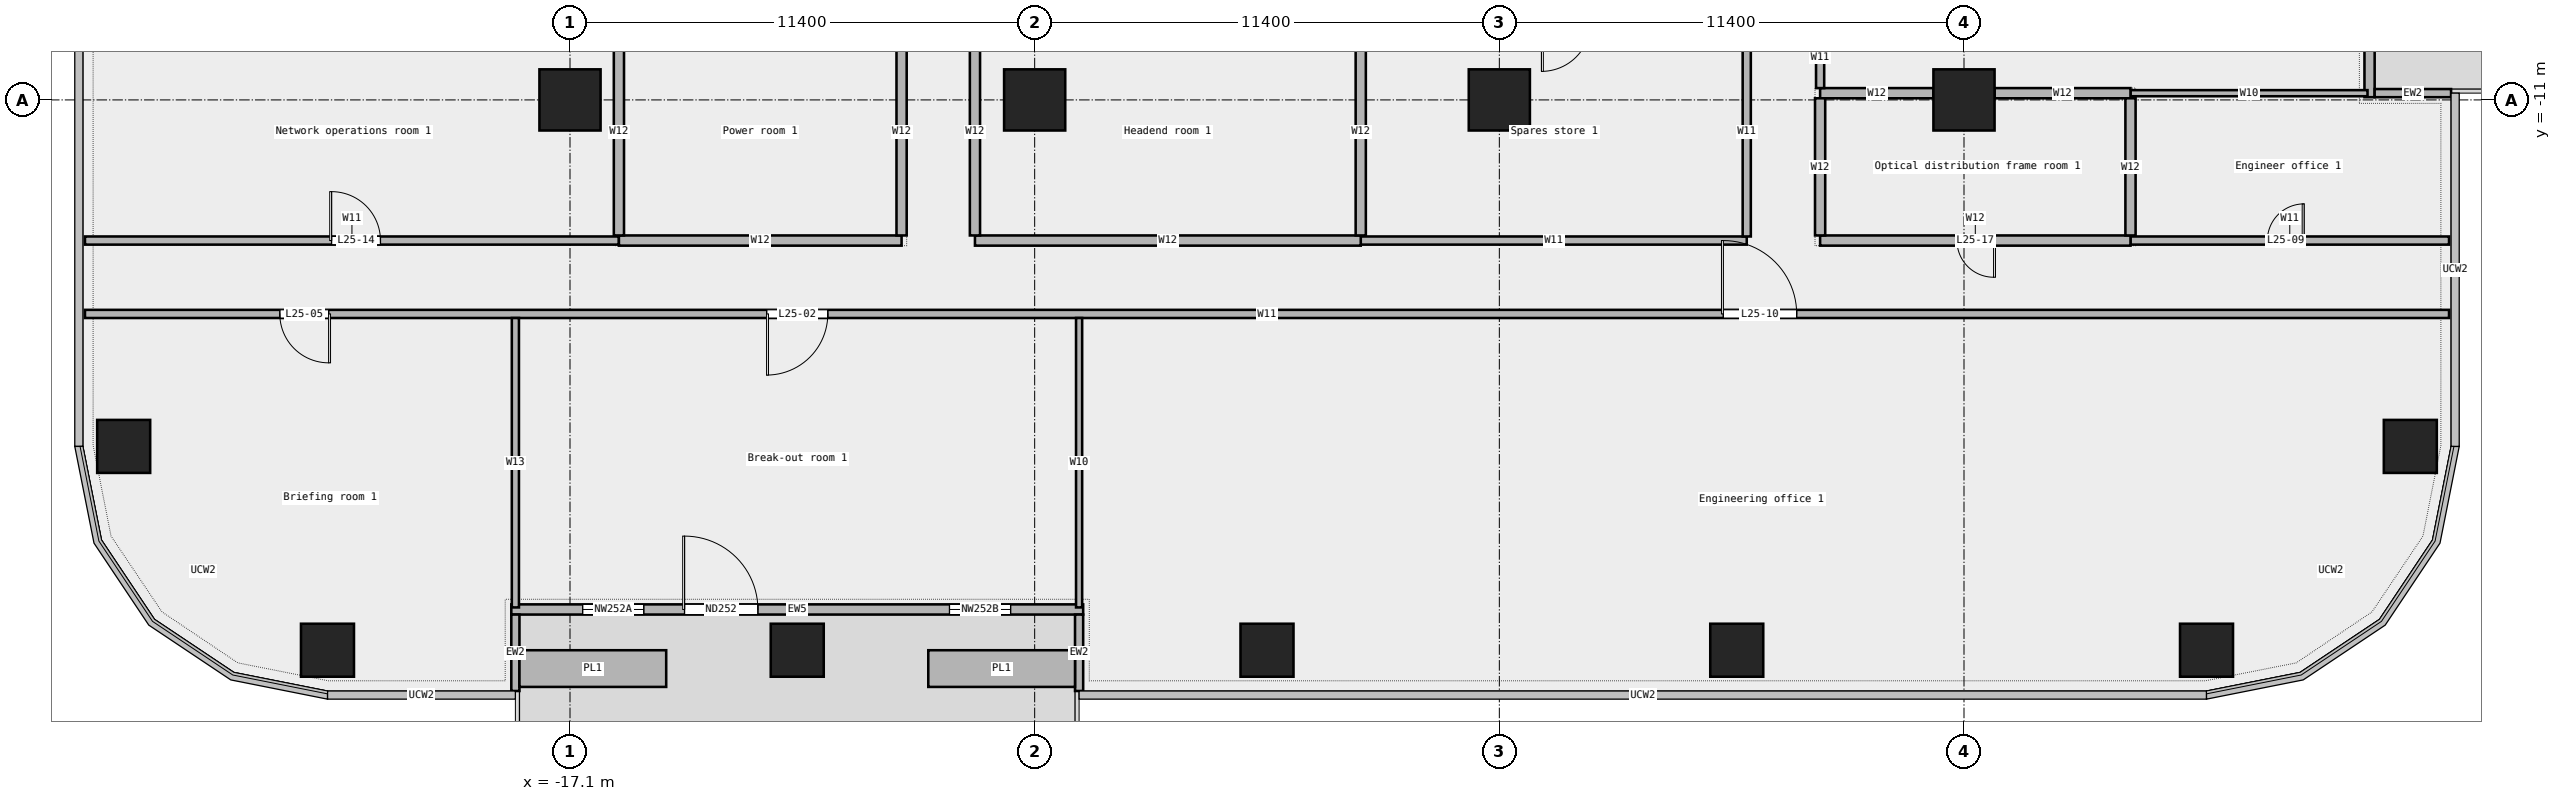
"""IFC4 building model, lengths in metres.
Left out: names, types, materials, properties, quantities, classifications, styles, units other than length and angle.
Written with IfcOpenShell. Run it as: python <this file> out.ifc"""

import sys

from ifc_helpers import new_model, si_unit, direction, frame, frame_2d, origin, origin_2d, place, context, subcontext, project, spatial, rectangle, extrude, element, fill, save


model = new_model("IFC4")
c1 = context("Model", 3, precision=1e-05, world=origin(), true_north=direction((0.0, 1.0)))
c2 = subcontext(c1, "Body", "Model", "MODEL_VIEW")
j1 = project(units=[si_unit("LENGTHUNIT", "METRE"), si_unit("PLANEANGLEUNIT", "RADIAN")], contexts=[c1])
p1 = place(None, origin())
s1 = spatial("IfcSite", under=j1, at=p1, CompositionType="ELEMENT")
p2 = place(p1, origin())
s2 = spatial("IfcBuilding", under=s1, at=p2, CompositionType="ELEMENT")
p3 = place(p2, frame((0.0, 0.0, 126.1)))
s3 = spatial("IfcBuildingStorey", under=s2, at=p3, CompositionType="ELEMENT", Elevation=126.1)
for number, where, z_axis, x_axis in (
    (1, (-23.05, -24.5, 0.0), (0.0, 0.0, 1.0), (1.0, 0.0, 0.0)),
    (2, (-11.525, -24.5, 0.0), (0.0, 0.0, 1.0), (1.0, 0.0, 0.0)),
    (3, (0.0, -24.5, 0.0), (0.0, 0.0, 1.0), (1.0, 0.0, 0.0)),
    (4, (11.525, -24.5, 0.0), (0.0, 0.0, 1.0), (1.0, 0.0, 0.0)),
    (5, (23.05, -24.5, 0.0), (0.0, 0.0, 1.0), (1.0, 0.0, 0.0)),
    (6, (28.05, -19.5, 0.0), (0.0, 0.0, 1.0), (1.0, 0.0, 0.0)),
    (7, (-28.05, -19.5, 0.0), (0.0, 0.0, 1.0), (1.0, 0.0, 0.0)),
):
    element("IfcColumn", number, at=place(p3, frame(where, z_axis=z_axis, x_axis=x_axis)), inside=s3, PredefinedType="COLUMN", context=c2, shape_type="SweptSolid", body=[
        extrude(rectangle(XDim=1.3, YDim=1.3, at=origin_2d()), origin(), (0.0, 0.0, 1.0), 4.05),
    ])
for number, where, z_axis, x_axis in (
    (8, (-17.1, -11.0, 0.0), (0.0, 0.0, 1.0), (1.0, 0.0, 0.0)),
    (9, (-5.7, -11.0, 0.0), (0.0, 0.0, 1.0), (1.0, 0.0, 0.0)),
    (10, (5.7, -11.0, 0.0), (0.0, 0.0, 1.0), (1.0, 0.0, 0.0)),
    (11, (17.1, -11.0, 0.0), (0.0, 0.0, 1.0), (1.0, 0.0, 0.0)),
):
    element("IfcColumn", number, at=place(p3, frame(where, z_axis=z_axis, x_axis=x_axis)), inside=s3, PredefinedType="COLUMN", context=c2, shape_type="SweptSolid", body=[
        extrude(rectangle(XDim=1.5, YDim=1.5, at=origin_2d()), origin(), (0.0, 0.0, 1.0), 4.05),
    ])
p4 = place(p3, frame((-18.54, -23.5, 0.0), z_axis=(0.0, 0.0, 1.0), x_axis=(1.0, 0.0, 0.0)))
e12 = element("IfcWall", 12, at=p4, inside=s3, PredefinedType="STANDARD", context=c2, shape_type="SweptSolid", body=[
    extrude(rectangle(XDim=14.03, YDim=0.25, at=frame_2d((7.015, 0.0))), origin(), (0.0, 0.0, 1.0), 4.05),
])
p5 = place(p4, frame((1.75, 0.0, 0.45)))
e13 = element("IfcOpeningElement", 13, at=p5, cuts=e12, PredefinedType="OPENING", context=c2, shape_type="SweptSolid", body=[
    extrude(rectangle(XDim=1.5, YDim=3.0, at=frame_2d((0.75, 1.5))), frame((0.0, 0.137, 0.0), z_axis=(0.0, -1.0, 0.0), x_axis=(1.0, 0.0, 0.0)), (0.0, 0.0, 1.0), 0.274),
])
p6 = place(p4, frame((4.25, 0.0, 0.0)))
e14 = element("IfcOpeningElement", 14, at=p6, cuts=e12, PredefinedType="OPENING", context=c2, shape_type="SweptSolid", body=[
    extrude(rectangle(XDim=1.8, YDim=2.4, at=frame_2d((0.9, 1.2))), frame((0.0, 0.137, 0.0), z_axis=(0.0, -1.0, 0.0), x_axis=(1.0, 0.0, 0.0)), (0.0, 0.0, 1.0), 0.274),
])
p7 = place(p4, frame((10.75, 0.0, 0.45)))
e15 = element("IfcOpeningElement", 15, at=p7, cuts=e12, PredefinedType="OPENING", context=c2, shape_type="SweptSolid", body=[
    extrude(rectangle(XDim=1.5, YDim=3.0, at=frame_2d((0.75, 1.5))), frame((0.0, 0.137, 0.0), z_axis=(0.0, -1.0, 0.0), x_axis=(1.0, 0.0, 0.0)), (0.0, 0.0, 1.0), 0.274),
])
for number, where, z_axis, x_axis in (
    (16, (-18.44, -25.5, 0.0), (0.0, 0.0, 1.0), (0.0, 1.0, 0.0)),
    (17, (-4.61, -25.5, 0.0), (0.0, 0.0, 1.0), (0.0, 1.0, 0.0)),
):
    element("IfcWall", number, at=place(p3, frame(where, z_axis=z_axis, x_axis=x_axis)), inside=s3, PredefinedType="STANDARD", context=c2, shape_type="SweptSolid", body=[
        extrude(rectangle(XDim=1.875, YDim=0.2, at=frame_2d((0.938, 0.0))), origin(), (0.0, 0.0, 1.0), 4.05),
    ])
for number, where, z_axis, x_axis in (
    (18, (-18.34, -24.95, 0.0), (0.0, 0.0, 1.0), (1.0, 0.0, 0.0)),
    (19, (-8.31, -24.95, 0.0), (0.0, 0.0, 1.0), (1.0, 0.0, 0.0)),
):
    element("IfcWall", number, at=place(p3, frame(where, z_axis=z_axis, x_axis=x_axis)), inside=s3, PredefinedType="STANDARD", context=c2, shape_type="SweptSolid", body=[
        extrude(rectangle(XDim=3.6, YDim=0.9, at=frame_2d((1.8, 0.0))), origin(), (0.0, 0.0, 1.0), 0.7),
    ])
p8 = place(p3, frame((27.05, -10.933, 0.0), z_axis=(0.0, 0.0, 1.0), x_axis=(0.0, 1.0, 0.0)))
e20 = element("IfcWall", 20, at=p8, inside=s3, PredefinedType="STANDARD", context=c2, shape_type="SweptSolid", body=[
    extrude(rectangle(XDim=13.2, YDim=0.25, at=frame_2d((6.6, 0.0))), origin(), (0.0, 0.0, 1.0), 4.05),
])
p9 = place(p8, frame((1.5, 0.0, 0.45)))
e21 = element("IfcOpeningElement", 21, at=p9, cuts=e20, PredefinedType="OPENING", context=c2, shape_type="SweptSolid", body=[
    extrude(rectangle(XDim=1.5, YDim=3.0, at=frame_2d((0.75, 1.5))), frame((0.0, 0.137, 0.0), z_axis=(0.0, -1.0, 0.0), x_axis=(1.0, 0.0, 0.0)), (0.0, 0.0, 1.0), 0.274),
])
p10 = place(p8, frame((5.75, 0.0, 0.0)))
e22 = element("IfcOpeningElement", 22, at=p10, cuts=e20, PredefinedType="OPENING", context=c2, shape_type="SweptSolid", body=[
    extrude(rectangle(XDim=1.8, YDim=2.4, at=frame_2d((0.9, 1.2))), frame((0.0, 0.137, 0.0), z_axis=(0.0, -1.0, 0.0), x_axis=(1.0, 0.0, 0.0)), (0.0, 0.0, 1.0), 0.274),
])
p11 = place(p8, frame((10.25, 0.0, 0.45)))
e23 = element("IfcOpeningElement", 23, at=p11, cuts=e20, PredefinedType="OPENING", context=c2, shape_type="SweptSolid", body=[
    extrude(rectangle(XDim=1.5, YDim=3.0, at=frame_2d((0.75, 1.5))), frame((0.0, 0.137, 0.0), z_axis=(0.0, -1.0, 0.0), x_axis=(1.0, 0.0, 0.0)), (0.0, 0.0, 1.0), 0.274),
])
p12 = place(p3, frame((29.05, -10.833, 0.0), z_axis=(0.0, 0.0, 1.0), x_axis=(-1.0, 0.0, 0.0)))
e24 = element("IfcWall", 24, at=p12, inside=s3, PredefinedType="STANDARD", context=c2, shape_type="SweptSolid", body=[
    extrude(rectangle(XDim=1.875, YDim=0.2, at=frame_2d((0.938, 0.0))), origin(), (0.0, 0.0, 1.0), 4.05),
])
p13 = place(p3, frame((-29.0, -16.25, 0.0), z_axis=(0.0, 0.0, 1.0), x_axis=(1.0, 0.0, 0.0)))
e25 = element("IfcWall", 25, at=p13, inside=s3, PredefinedType="PARTITIONING", context=c2, shape_type="SweptSolid", body=[
    extrude(rectangle(XDim=58.0, YDim=0.2, at=frame_2d((29.0, 0.0))), origin(), (0.0, 0.0, 1.0), 4.05),
])
p14 = place(p13, frame((16.725, 0.0, 0.0)))
e26 = element("IfcOpeningElement", 26, at=p14, cuts=e25, PredefinedType="OPENING", context=c2, shape_type="SweptSolid", body=[
    extrude(rectangle(XDim=1.5, YDim=2.1, at=frame_2d((0.75, 1.05))), frame((0.0, 0.112, 0.0), z_axis=(0.0, -1.0, 0.0), x_axis=(1.0, 0.0, 0.0)), (0.0, 0.0, 1.0), 0.224),
])
p15 = place(p13, frame((4.78, 0.0, 0.0)))
e27 = element("IfcOpeningElement", 27, at=p15, cuts=e25, PredefinedType="OPENING", context=c2, shape_type="SweptSolid", body=[
    extrude(rectangle(XDim=1.2, YDim=2.1, at=frame_2d((0.6, 1.05))), frame((0.0, 0.112, 0.0), z_axis=(0.0, -1.0, 0.0), x_axis=(1.0, 0.0, 0.0)), (0.0, 0.0, 1.0), 0.224),
])
p16 = place(p13, frame((40.195, 0.0, 0.0)))
e28 = element("IfcOpeningElement", 28, at=p16, cuts=e25, PredefinedType="OPENING", context=c2, shape_type="SweptSolid", body=[
    extrude(rectangle(XDim=1.8, YDim=2.1, at=frame_2d((0.9, 1.05))), frame((0.0, 0.112, 0.0), z_axis=(0.0, -1.0, 0.0), x_axis=(1.0, 0.0, 0.0)), (0.0, 0.0, 1.0), 0.224),
])
p17 = place(p3, frame((-29.0, -14.45, 0.0), z_axis=(0.0, 0.0, 1.0), x_axis=(1.0, 0.0, 0.0)))
e29 = element("IfcWall", 29, at=p17, inside=s3, PredefinedType="PARTITIONING", context=c2, shape_type="SweptSolid", body=[
    extrude(rectangle(XDim=13.1, YDim=0.2, at=frame_2d((6.55, 0.0))), origin(), (0.0, 0.0, 1.0), 4.05),
])
p18 = place(p17, frame((6.05, 0.0, 0.0)))
e30 = element("IfcOpeningElement", 30, at=p18, cuts=e29, PredefinedType="OPENING", context=c2, shape_type="SweptSolid", body=[
    extrude(rectangle(XDim=1.2, YDim=2.1, at=frame_2d((0.6, 1.05))), frame((0.0, 0.112, 0.0), z_axis=(0.0, -1.0, 0.0), x_axis=(1.0, 0.0, 0.0)), (0.0, 0.0, 1.0), 0.224),
])
p19 = place(p3, frame((2.3, -14.45, 0.0), z_axis=(0.0, 0.0, 1.0), x_axis=(1.0, 0.0, 0.0)))
e31 = element("IfcWall", 31, at=p19, inside=s3, PredefinedType="PARTITIONING", context=c2, shape_type="SweptSolid", body=[
    extrude(rectangle(XDim=9.47, YDim=0.2, at=frame_2d((4.735, 0.0))), origin(), (0.0, 0.0, 1.0), 4.05),
])
p20 = place(p3, frame((21.185, -14.45, 0.0), z_axis=(0.0, 0.0, 1.0), x_axis=(1.0, 0.0, 0.0)))
e32 = element("IfcWall", 32, at=p20, inside=s3, PredefinedType="PARTITIONING", context=c2, shape_type="SweptSolid", body=[
    extrude(rectangle(XDim=7.815, YDim=0.2, at=frame_2d((3.907, 0.0))), origin(), (0.0, 0.0, 1.0), 4.05),
])
p21 = place(p20, frame((3.357, 0.0, 0.0)))
e33 = element("IfcOpeningElement", 33, at=p21, cuts=e32, PredefinedType="OPENING", context=c2, shape_type="SweptSolid", body=[
    extrude(rectangle(XDim=0.9, YDim=2.1, at=frame_2d((0.45, 1.05))), frame((0.0, 0.112, 0.0), z_axis=(0.0, -1.0, 0.0), x_axis=(1.0, 0.0, 0.0)), (0.0, 0.0, 1.0), 0.224),
])
p22 = place(p3, frame((-15.9, -14.45, 0.0), z_axis=(0.0, 0.0, 1.0), x_axis=(1.0, 0.0, 0.0)))
e34 = element("IfcWall", 34, at=p22, inside=s3, PredefinedType="PARTITIONING", context=c2, shape_type="SweptSolid", body=[
    extrude(rectangle(XDim=6.935, YDim=0.25, at=frame_2d((3.467, 0.0))), origin(), (0.0, 0.0, 1.0), 4.05),
])
p23 = place(p3, frame((-7.165, -14.45, 0.0), z_axis=(0.0, 0.0, 1.0), x_axis=(1.0, 0.0, 0.0)))
e35 = element("IfcWall", 35, at=p23, inside=s3, PredefinedType="PARTITIONING", context=c2, shape_type="SweptSolid", body=[
    extrude(rectangle(XDim=9.465, YDim=0.25, at=frame_2d((4.732, 0.0))), origin(), (0.0, 0.0, 1.0), 4.05),
])
p24 = place(p3, frame((13.57, -14.45, 0.0), z_axis=(0.0, 0.0, 1.0), x_axis=(1.0, 0.0, 0.0)))
e36 = element("IfcWall", 36, at=p24, inside=s3, PredefinedType="PARTITIONING", context=c2, shape_type="SweptSolid", body=[
    extrude(rectangle(XDim=7.615, YDim=0.25, at=frame_2d((3.808, 0.0))), origin(), (0.0, 0.0, 1.0), 4.05),
])
p25 = place(p24, frame((3.357, 0.0, 0.0)))
e37 = element("IfcOpeningElement", 37, at=p25, cuts=e36, PredefinedType="OPENING", context=c2, shape_type="SweptSolid", body=[
    extrude(rectangle(XDim=0.9, YDim=2.1, at=frame_2d((0.45, 1.05))), frame((0.0, 0.137, 0.0), z_axis=(0.0, -1.0, 0.0), x_axis=(1.0, 0.0, 0.0)), (0.0, 0.0, 1.0), 0.274),
])
p26 = place(p3, frame((21.185, -10.835, 0.0), z_axis=(0.0, 0.0, 1.0), x_axis=(1.0, 0.0, 0.0)))
e38 = element("IfcWall", 38, at=p26, inside=s3, PredefinedType="PARTITIONING", context=c2, shape_type="SweptSolid", body=[
    extrude(rectangle(XDim=5.815, YDim=0.15, at=frame_2d((2.907, 0.0))), origin(), (0.0, 0.0, 1.0), 4.05),
])
p27 = place(p3, frame((13.57, -10.835, 0.0), z_axis=(0.0, 0.0, 1.0), x_axis=(1.0, 0.0, 0.0)))
e39 = element("IfcWall", 39, at=p27, inside=s3, PredefinedType="PARTITIONING", context=c2, shape_type="SweptSolid", body=[
    extrude(rectangle(XDim=2.78, YDim=0.25, at=frame_2d((1.39, 0.0))), origin(), (0.0, 0.0, 1.0), 4.05),
])
p28 = place(p3, frame((17.85, -10.835, 0.0), z_axis=(0.0, 0.0, 1.0), x_axis=(1.0, 0.0, 0.0)))
e40 = element("IfcWall", 40, at=p28, inside=s3, PredefinedType="PARTITIONING", context=c2, shape_type="SweptSolid", body=[
    extrude(rectangle(XDim=3.335, YDim=0.25, at=frame_2d((1.667, 0.0))), origin(), (0.0, 0.0, 1.0), 4.05),
])
p29 = place(p3, frame((-18.44, -23.45, 0.0), z_axis=(0.0, 0.0, 1.0), x_axis=(0.0, 1.0, 0.0)))
e41 = element("IfcWall", 41, at=p29, inside=s3, PredefinedType="PARTITIONING", context=c2, shape_type="SweptSolid", body=[
    extrude(rectangle(XDim=7.1, YDim=0.175, at=frame_2d((3.55, 0.0))), origin(), (0.0, 0.0, 1.0), 4.05),
])
for number, where, z_axis, x_axis in (
    (42, (-15.9, -14.325, 0.0), (0.0, 0.0, 1.0), (0.0, 1.0, 0.0)),
    (43, (-8.965, -14.325, 0.0), (0.0, 0.0, 1.0), (0.0, 1.0, 0.0)),
    (44, (-7.165, -14.325, 0.0), (0.0, 0.0, 1.0), (0.0, 1.0, 0.0)),
):
    element("IfcWall", number, at=place(p3, frame(where, z_axis=z_axis, x_axis=x_axis)), inside=s3, PredefinedType="PARTITIONING", context=c2, shape_type="SweptSolid", body=[
        extrude(rectangle(XDim=5.1, YDim=0.25, at=frame_2d((2.55, 0.0))), origin(), (0.0, 0.0, 1.0), 4.05),
    ])
p30 = place(p3, frame((-4.61, -23.45, 0.0), z_axis=(0.0, 0.0, 1.0), x_axis=(0.0, 1.0, 0.0)))
e45 = element("IfcWall", 45, at=p30, inside=s3, PredefinedType="PARTITIONING", context=c2, shape_type="SweptSolid", body=[
    extrude(rectangle(XDim=7.1, YDim=0.15, at=frame_2d((3.55, 0.0))), origin(), (0.0, 0.0, 1.0), 4.05),
])
p31 = place(p3, frame((2.3, -14.325, 0.0), z_axis=(0.0, 0.0, 1.0), x_axis=(0.0, 1.0, 0.0)))
e46 = element("IfcWall", 46, at=p31, inside=s3, PredefinedType="PARTITIONING", context=c2, shape_type="SweptSolid", body=[
    extrude(rectangle(XDim=5.1, YDim=0.25, at=frame_2d((2.55, 0.0))), origin(), (0.0, 0.0, 1.0), 4.05),
])
p32 = place(p3, frame((11.77, -14.35, 0.0), z_axis=(0.0, 0.0, 1.0), x_axis=(0.0, 1.0, 0.0)))
e47 = element("IfcWall", 47, at=p32, inside=s3, PredefinedType="PARTITIONING", context=c2, shape_type="SweptSolid", body=[
    extrude(rectangle(XDim=5.15, YDim=0.2, at=frame_2d((2.575, 0.0))), origin(), (0.0, 0.0, 1.0), 4.05),
])
p33 = place(p3, frame((13.57, -10.71, 0.0), z_axis=(0.0, 0.0, 1.0), x_axis=(0.0, 1.0, 0.0)))
e48 = element("IfcWall", 48, at=p33, inside=s3, PredefinedType="PARTITIONING", context=c2, shape_type="SweptSolid", body=[
    extrude(rectangle(XDim=1.51, YDim=0.2, at=frame_2d((0.755, 0.0))), origin(), (0.0, 0.0, 1.0), 4.05),
])
for number, where, z_axis, x_axis in (
    (49, (13.57, -14.325, 0.0), (0.0, 0.0, 1.0), (0.0, 1.0, 0.0)),
    (50, (21.185, -14.325, 0.0), (0.0, 0.0, 1.0), (0.0, 1.0, 0.0)),
):
    element("IfcWall", number, at=place(p3, frame(where, z_axis=z_axis, x_axis=x_axis)), inside=s3, PredefinedType="PARTITIONING", context=c2, shape_type="SweptSolid", body=[
        extrude(rectangle(XDim=3.365, YDim=0.25, at=frame_2d((1.683, 0.0))), origin(), (0.0, 0.0, 1.0), 4.05),
    ])
p34 = place(p5, origin())
e51 = element("IfcWindow", 51, at=p34, inside=s3, PartitioningType="SINGLE_PANEL", PredefinedType="WINDOW", context=c2, shape_type="SweptSolid", body=[
    extrude(rectangle(XDim=1.5, YDim=3.0, at=frame_2d((0.75, 1.5))), frame((0.0, 0.03, 0.0), z_axis=(0.0, -1.0, 0.0), x_axis=(1.0, 0.0, 0.0)), (0.0, 0.0, 1.0), 0.06),
])
fill(e13, e51)
p35 = place(p6, origin())
e52 = element("IfcDoor", 52, at=p35, inside=s3, OperationType="DOUBLE_DOOR_SINGLE_SWING", PredefinedType="DOOR", context=c2, shape_type="SweptSolid", body=[
    extrude(rectangle(XDim=1.8, YDim=2.4, at=frame_2d((0.9, 1.2))), frame((0.0, 0.025, 0.0), z_axis=(0.0, -1.0, 0.0), x_axis=(1.0, 0.0, 0.0)), (0.0, 0.0, 1.0), 0.05),
])
fill(e14, e52)
p36 = place(p7, origin())
e53 = element("IfcWindow", 53, at=p36, inside=s3, PartitioningType="SINGLE_PANEL", PredefinedType="WINDOW", context=c2, shape_type="SweptSolid", body=[
    extrude(rectangle(XDim=1.5, YDim=3.0, at=frame_2d((0.75, 1.5))), frame((0.0, 0.03, 0.0), z_axis=(0.0, -1.0, 0.0), x_axis=(1.0, 0.0, 0.0)), (0.0, 0.0, 1.0), 0.06),
])
fill(e15, e53)
p37 = place(p14, origin())
e54 = element("IfcDoor", 54, at=p37, inside=s3, OperationType="DOUBLE_DOOR_SINGLE_SWING", PredefinedType="DOOR", context=c2, shape_type="SweptSolid", body=[
    extrude(rectangle(XDim=1.5, YDim=2.1, at=frame_2d((0.75, 1.05))), frame((0.0, 0.025, 0.0), z_axis=(0.0, -1.0, 0.0), x_axis=(1.0, 0.0, 0.0)), (0.0, 0.0, 1.0), 0.05),
])
fill(e26, e54)
p38 = place(p15, origin())
e55 = element("IfcDoor", 55, at=p38, inside=s3, OperationType="SINGLE_SWING_LEFT", PredefinedType="DOOR", context=c2, shape_type="SweptSolid", body=[
    extrude(rectangle(XDim=1.2, YDim=2.1, at=frame_2d((0.6, 1.05))), frame((0.0, 0.025, 0.0), z_axis=(0.0, -1.0, 0.0), x_axis=(1.0, 0.0, 0.0)), (0.0, 0.0, 1.0), 0.05),
])
fill(e27, e55)
p39 = place(p21, origin())
e56 = element("IfcDoor", 56, at=p39, inside=s3, OperationType="SINGLE_SWING_RIGHT", PredefinedType="DOOR", context=c2, shape_type="SweptSolid", body=[
    extrude(rectangle(XDim=0.9, YDim=2.1, at=frame_2d((0.45, 1.05))), frame((0.0, 0.025, 0.0), z_axis=(0.0, -1.0, 0.0), x_axis=(1.0, 0.0, 0.0)), (0.0, 0.0, 1.0), 0.05),
])
fill(e33, e56)
p40 = place(p16, origin())
e57 = element("IfcDoor", 57, at=p40, inside=s3, OperationType="DOUBLE_DOOR_SINGLE_SWING", PredefinedType="DOOR", context=c2, shape_type="SweptSolid", body=[
    extrude(rectangle(XDim=1.8, YDim=2.1, at=frame_2d((0.9, 1.05))), frame((0.0, 0.025, 0.0), z_axis=(0.0, -1.0, 0.0), x_axis=(1.0, 0.0, 0.0)), (0.0, 0.0, 1.0), 0.05),
])
fill(e28, e57)
p41 = place(p18, origin())
e58 = element("IfcDoor", 58, at=p41, inside=s3, OperationType="SINGLE_SWING_LEFT", PredefinedType="DOOR", context=c2, shape_type="SweptSolid", body=[
    extrude(rectangle(XDim=1.2, YDim=2.1, at=frame_2d((0.6, 1.05))), frame((0.0, 0.025, 0.0), z_axis=(0.0, -1.0, 0.0), x_axis=(1.0, 0.0, 0.0)), (0.0, 0.0, 1.0), 0.05),
])
fill(e30, e58)
p42 = place(p25, origin())
e59 = element("IfcDoor", 59, at=p42, inside=s3, OperationType="SINGLE_SWING_LEFT", PredefinedType="DOOR", context=c2, shape_type="SweptSolid", body=[
    extrude(rectangle(XDim=0.9, YDim=2.1, at=frame_2d((0.45, 1.05))), frame((0.0, 0.025, 0.0), z_axis=(0.0, -1.0, 0.0), x_axis=(1.0, 0.0, 0.0)), (0.0, 0.0, 1.0), 0.05),
])
fill(e37, e59)
save(model, sys.argv[1])
